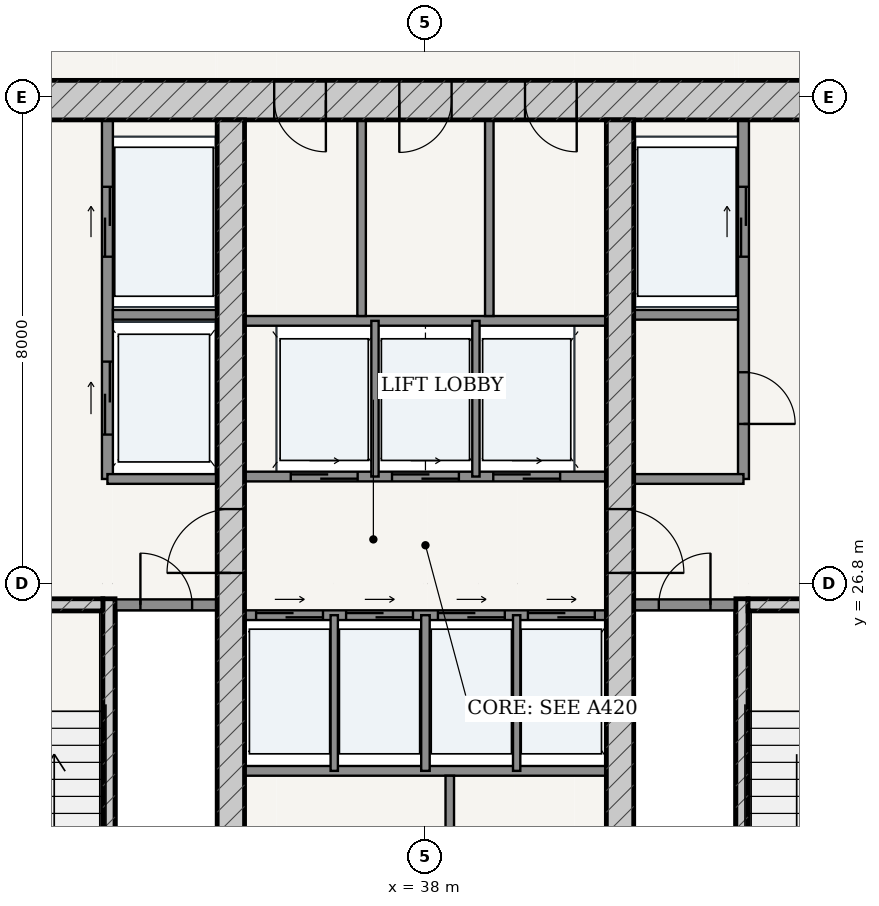
"""IFC4 building model, lengths in metres.
Left out: names, types, materials, properties, quantities, classifications, styles, units other than length and angle.
Written with IfcOpenShell. Run it as: python <this file> out.ifc"""

import sys

from ifc_helpers import new_model, si_unit, direction, frame, frame_2d, origin, place, context, subcontext, project, spatial, rectangle, extrude, source, transform, mapped, element, fill, save


model = new_model("IFC4")
c1 = context("Model", 3, precision=1e-05, world=origin(), true_north=direction((-0.2419218956, 0.970295726276)))
c2 = subcontext(c1, "Body", "Model", "MODEL_VIEW")
j1 = project(units=[si_unit("LENGTHUNIT", "METRE"), si_unit("PLANEANGLEUNIT", "RADIAN")], contexts=[c1])
p1 = place(None, origin())
s1 = spatial("IfcSite", under=j1, at=p1, CompositionType="ELEMENT")
p2 = place(p1, origin())
s2 = spatial("IfcBuilding", under=s1, at=p2, CompositionType="ELEMENT")
p3 = place(p2, frame((0.0, 0.0, 130.2)))
s3 = spatial("IfcBuildingStorey", under=s2, at=p3, CompositionType="ELEMENT", Elevation=130.2)
p4 = place(p3, frame((28.725, 34.75, 0.0), z_axis=(0.0, 0.0, 1.0), x_axis=(1.0, 0.0, 0.0)))
e1 = element("IfcWall", 1, at=p4, inside=s3, PredefinedType="SHEAR", context=c2, shape_type="SweptSolid", body=[
    extrude(rectangle(XDim=18.55, YDim=0.65, at=frame_2d((9.275, 0.0))), origin(), (0.0, 0.0, 1.0), 4.93),
])
p5 = place(p4, frame((6.788, 0.0, 0.0)))
e2 = element("IfcOpeningElement", 2, at=p5, cuts=e1, PredefinedType="OPENING", context=c2, shape_type="SweptSolid", body=[
    extrude(rectangle(XDim=0.85, YDim=2.1, at=frame_2d((0.425, 1.05))), frame((0.0, 0.335, 0.0), z_axis=(0.0, -1.0, 0.0), x_axis=(1.0, 0.0, 0.0)), (0.0, 0.0, 1.0), 0.67),
])
p6 = place(p4, frame((8.845, 0.0, 0.0)))
e3 = element("IfcOpeningElement", 3, at=p6, cuts=e1, PredefinedType="OPENING", context=c2, shape_type="SweptSolid", body=[
    extrude(rectangle(XDim=0.86, YDim=2.1, at=frame_2d((0.43, 1.05))), frame((0.0, 0.335, 0.0), z_axis=(0.0, -1.0, 0.0), x_axis=(1.0, 0.0, 0.0)), (0.0, 0.0, 1.0), 0.67),
])
p7 = place(p4, frame((10.913, 0.0, 0.0)))
e4 = element("IfcOpeningElement", 4, at=p7, cuts=e1, PredefinedType="OPENING", context=c2, shape_type="SweptSolid", body=[
    extrude(rectangle(XDim=0.85, YDim=2.1, at=frame_2d((0.425, 1.05))), frame((0.0, 0.335, 0.0), z_axis=(0.0, -1.0, 0.0), x_axis=(1.0, 0.0, 0.0)), (0.0, 0.0, 1.0), 0.67),
])
p8 = place(p3, frame((32.795, 19.175, 0.0), z_axis=(0.0, 0.0, 1.0), x_axis=(0.0, 1.0, 0.0)))
e5 = element("IfcWall", 5, at=p8, inside=s3, PredefinedType="SOLIDWALL", context=c2, shape_type="SweptSolid", body=[
    extrude(rectangle(XDim=7.375, YDim=0.2, at=frame_2d((3.688, 0.0))), origin(), (0.0, 0.0, 1.0), 4.93),
])
p9 = place(p3, frame((29.375, 26.45, 0.0), z_axis=(0.0, 0.0, 1.0), x_axis=(1.0, 0.0, 0.0)))
e6 = element("IfcWall", 6, at=p9, inside=s3, PredefinedType="SOLIDWALL", context=c2, shape_type="SweptSolid", body=[
    extrude(rectangle(XDim=3.32, YDim=0.2, at=frame_2d((1.66, 0.0))), origin(), (0.0, 0.0, 1.0), 4.93),
])
p10 = place(p9, frame((1.185, 0.0, 0.0)))
e7 = element("IfcOpeningElement", 7, at=p10, cuts=e6, PredefinedType="OPENING", context=c2, shape_type="SweptSolid", body=[
    extrude(rectangle(XDim=0.95, YDim=2.15, at=frame_2d((0.475, 1.075))), frame((0.0, 0.11, 0.0), z_axis=(0.0, -1.0, 0.0), x_axis=(1.0, 0.0, 0.0)), (0.0, 0.0, 1.0), 0.22),
])
p11 = place(p3, frame((43.205, 19.175, 0.0), z_axis=(0.0, 0.0, 1.0), x_axis=(0.0, 1.0, 0.0)))
e8 = element("IfcWall", 8, at=p11, inside=s3, PredefinedType="SOLIDWALL", context=c2, shape_type="SweptSolid", body=[
    extrude(rectangle(XDim=7.375, YDim=0.2, at=frame_2d((3.688, 0.0))), origin(), (0.0, 0.0, 1.0), 4.93),
])
p12 = place(p3, frame((43.305, 26.45, 0.0), z_axis=(0.0, 0.0, 1.0), x_axis=(1.0, 0.0, 0.0)))
e9 = element("IfcWall", 9, at=p12, inside=s3, PredefinedType="SOLIDWALL", context=c2, shape_type="SweptSolid", body=[
    extrude(rectangle(XDim=3.32, YDim=0.2, at=frame_2d((1.66, 0.0))), origin(), (0.0, 0.0, 1.0), 4.93),
])
p13 = place(p12, frame((1.185, 0.0, 0.0)))
e10 = element("IfcOpeningElement", 10, at=p13, cuts=e9, PredefinedType="OPENING", context=c2, shape_type="SweptSolid", body=[
    extrude(rectangle(XDim=0.95, YDim=2.15, at=frame_2d((0.475, 1.075))), frame((0.0, 0.11, 0.0), z_axis=(0.0, -1.0, 0.0), x_axis=(1.0, 0.0, 0.0)), (0.0, 0.0, 1.0), 0.22),
])
p14 = place(p3, frame((34.8, 19.175, 0.0), z_axis=(0.0, 0.0, 1.0), x_axis=(0.0, 1.0, 0.0)))
e11 = element("IfcWall", 11, at=p14, inside=s3, PredefinedType="SHEAR", context=c2, shape_type="SweptSolid", body=[
    extrude(rectangle(XDim=15.25, YDim=0.45, at=frame_2d((7.625, 0.0))), origin(), (0.0, 0.0, 1.0), 4.93),
])
p15 = place(p14, frame((7.8, 0.0, 0.0)))
e12 = element("IfcOpeningElement", 12, at=p15, cuts=e11, PredefinedType="OPENING", context=c2, shape_type="SweptSolid", body=[
    extrude(rectangle(XDim=1.05, YDim=2.15, at=frame_2d((0.525, 1.075))), frame((0.0, 0.235, 0.0), z_axis=(0.0, -1.0, 0.0), x_axis=(1.0, 0.0, 0.0)), (0.0, 0.0, 1.0), 0.47),
])
p16 = place(p3, frame((41.2, 19.175, 0.0), z_axis=(0.0, 0.0, 1.0), x_axis=(0.0, 1.0, 0.0)))
e13 = element("IfcWall", 13, at=p16, inside=s3, PredefinedType="SHEAR", context=c2, shape_type="SweptSolid", body=[
    extrude(rectangle(XDim=15.25, YDim=0.45, at=frame_2d((7.625, 0.0))), origin(), (0.0, 0.0, 1.0), 4.93),
])
p17 = place(p16, frame((7.8, 0.0, 0.0)))
e14 = element("IfcOpeningElement", 14, at=p17, cuts=e13, PredefinedType="OPENING", context=c2, shape_type="SweptSolid", body=[
    extrude(rectangle(XDim=1.05, YDim=2.15, at=frame_2d((0.525, 1.075))), frame((0.0, 0.235, 0.0), z_axis=(0.0, -1.0, 0.0), x_axis=(1.0, 0.0, 0.0)), (0.0, 0.0, 1.0), 0.47),
])
p18 = place(p3, frame((32.9, 26.45, 0.0), z_axis=(0.0, 0.0, 1.0), x_axis=(1.0, 0.0, 0.0)))
e15 = element("IfcWall", 15, at=p18, inside=s3, PredefinedType="PARTITIONING", context=c2, shape_type="SweptSolid", body=[
    extrude(rectangle(XDim=1.675, YDim=0.18, at=frame_2d((0.837, 0.0))), origin(), (0.0, 0.0, 1.0), 4.93),
])
p19 = place(p18, frame((0.413, 0.0, 0.0)))
e16 = element("IfcOpeningElement", 16, at=p19, cuts=e15, PredefinedType="OPENING", context=c2, shape_type="SweptSolid", body=[
    extrude(rectangle(XDim=0.85, YDim=2.1, at=frame_2d((0.425, 1.05))), frame((0.0, 0.1, 0.0), z_axis=(0.0, -1.0, 0.0), x_axis=(1.0, 0.0, 0.0)), (0.0, 0.0, 1.0), 0.2),
])
p20 = place(p3, frame((41.425, 26.45, 0.0), z_axis=(0.0, 0.0, 1.0), x_axis=(1.0, 0.0, 0.0)))
e17 = element("IfcWall", 17, at=p20, inside=s3, PredefinedType="PARTITIONING", context=c2, shape_type="SweptSolid", body=[
    extrude(rectangle(XDim=1.675, YDim=0.18, at=frame_2d((0.837, 0.0))), origin(), (0.0, 0.0, 1.0), 4.93),
])
p21 = place(p20, frame((0.413, 0.0, 0.0)))
e18 = element("IfcOpeningElement", 18, at=p21, cuts=e17, PredefinedType="OPENING", context=c2, shape_type="SweptSolid", body=[
    extrude(rectangle(XDim=0.85, YDim=2.1, at=frame_2d((0.425, 1.05))), frame((0.0, 0.1, 0.0), z_axis=(0.0, -1.0, 0.0), x_axis=(1.0, 0.0, 0.0)), (0.0, 0.0, 1.0), 0.2),
])
p22 = place(p3, frame((32.77, 28.52, 0.0), z_axis=(0.0, 0.0, 1.0), x_axis=(0.0, 1.0, 0.0)))
e19 = element("IfcWall", 19, at=p22, inside=s3, PredefinedType="PARTITIONING", context=c2, shape_type="SweptSolid", body=[
    extrude(rectangle(XDim=5.905, YDim=0.18, at=frame_2d((2.953, 0.0))), origin(), (0.0, 0.0, 1.0), 4.93),
])
p23 = place(p22, frame((3.655, 0.0, 0.0)))
e20 = element("IfcOpeningElement", 20, at=p23, cuts=e19, PredefinedType="OPENING", context=c2, shape_type="SweptSolid", body=[
    extrude(rectangle(XDim=1.15, YDim=2.2, at=frame_2d((0.575, 1.1))), frame((0.0, 0.1, 0.0), z_axis=(0.0, -1.0, 0.0), x_axis=(1.0, 0.0, 0.0)), (0.0, 0.0, 1.0), 0.2),
])
p24 = place(p22, frame((0.73, 0.0, 0.0)))
e21 = element("IfcOpeningElement", 21, at=p24, cuts=e19, PredefinedType="OPENING", context=c2, shape_type="SweptSolid", body=[
    extrude(rectangle(XDim=1.2, YDim=2.25, at=frame_2d((0.6, 1.125))), frame((0.0, 0.1, 0.0), z_axis=(0.0, -1.0, 0.0), x_axis=(1.0, 0.0, 0.0)), (0.0, 0.0, 1.0), 0.2),
])
p25 = place(p3, frame((32.86, 31.22, 0.0), z_axis=(0.0, 0.0, 1.0), x_axis=(1.0, 0.0, 0.0)))
e22 = element("IfcWall", 22, at=p25, inside=s3, PredefinedType="PARTITIONING", context=c2, shape_type="SweptSolid", body=[
    extrude(rectangle(XDim=1.715, YDim=0.16, at=frame_2d((0.857, 0.0))), origin(), (0.0, 0.0, 1.0), 4.93),
])
p26 = place(p3, frame((32.77, 28.52, 0.0), z_axis=(0.0, 0.0, 1.0), x_axis=(1.0, 0.0, 0.0)))
e23 = element("IfcWall", 23, at=p26, inside=s3, PredefinedType="PARTITIONING", context=c2, shape_type="SweptSolid", body=[
    extrude(rectangle(XDim=1.805, YDim=0.16, at=frame_2d((0.902, 0.0))), origin(), (0.0, 0.0, 1.0), 4.93),
])
p27 = place(p3, frame((43.23, 28.52, 0.0), z_axis=(0.0, 0.0, 1.0), x_axis=(0.0, 1.0, 0.0)))
e24 = element("IfcWall", 24, at=p27, inside=s3, PredefinedType="PARTITIONING", context=c2, shape_type="SweptSolid", body=[
    extrude(rectangle(XDim=5.905, YDim=0.18, at=frame_2d((2.953, 0.0))), origin(), (0.0, 0.0, 1.0), 4.93),
])
p28 = place(p27, frame((0.905, 0.0, 0.0)))
e25 = element("IfcOpeningElement", 25, at=p28, cuts=e24, PredefinedType="OPENING", context=c2, shape_type="SweptSolid", body=[
    extrude(rectangle(XDim=0.85, YDim=2.1, at=frame_2d((0.425, 1.05))), frame((0.0, 0.1, 0.0), z_axis=(0.0, -1.0, 0.0), x_axis=(1.0, 0.0, 0.0)), (0.0, 0.0, 1.0), 0.2),
])
p29 = place(p27, frame((3.655, 0.0, 0.0)))
e26 = element("IfcOpeningElement", 26, at=p29, cuts=e24, PredefinedType="OPENING", context=c2, shape_type="SweptSolid", body=[
    extrude(rectangle(XDim=1.15, YDim=2.2, at=frame_2d((0.575, 1.1))), frame((0.0, 0.1, 0.0), z_axis=(0.0, -1.0, 0.0), x_axis=(1.0, 0.0, 0.0)), (0.0, 0.0, 1.0), 0.2),
])
p30 = place(p3, frame((41.425, 31.22, 0.0), z_axis=(0.0, 0.0, 1.0), x_axis=(1.0, 0.0, 0.0)))
e27 = element("IfcWall", 27, at=p30, inside=s3, PredefinedType="PARTITIONING", context=c2, shape_type="SweptSolid", body=[
    extrude(rectangle(XDim=1.715, YDim=0.16, at=frame_2d((0.857, 0.0))), origin(), (0.0, 0.0, 1.0), 4.93),
])
p31 = place(p3, frame((41.425, 28.52, 0.0), z_axis=(0.0, 0.0, 1.0), x_axis=(1.0, 0.0, 0.0)))
e28 = element("IfcWall", 28, at=p31, inside=s3, PredefinedType="PARTITIONING", context=c2, shape_type="SweptSolid", body=[
    extrude(rectangle(XDim=1.805, YDim=0.16, at=frame_2d((0.902, 0.0))), origin(), (0.0, 0.0, 1.0), 4.93),
])
p32 = place(p3, frame((35.025, 28.56, 0.0), z_axis=(0.0, 0.0, 1.0), x_axis=(1.0, 0.0, 0.0)))
e29 = element("IfcWall", 29, at=p32, inside=s3, PredefinedType="PARTITIONING", context=c2, shape_type="SweptSolid", body=[
    extrude(rectangle(XDim=5.95, YDim=0.16, at=frame_2d((2.975, 0.0))), origin(), (0.0, 0.0, 1.0), 4.93),
])
p33 = place(p32, frame((0.76, 0.0, 0.0)))
e30 = element("IfcOpeningElement", 30, at=p33, cuts=e29, PredefinedType="OPENING", context=c2, shape_type="SweptSolid", body=[
    extrude(rectangle(XDim=1.1, YDim=2.2, at=frame_2d((0.55, 1.1))), frame((0.0, 0.09, 0.0), z_axis=(0.0, -1.0, 0.0), x_axis=(1.0, 0.0, 0.0)), (0.0, 0.0, 1.0), 0.18),
])
p34 = place(p32, frame((2.425, 0.0, 0.0)))
e31 = element("IfcOpeningElement", 31, at=p34, cuts=e29, PredefinedType="OPENING", context=c2, shape_type="SweptSolid", body=[
    extrude(rectangle(XDim=1.1, YDim=2.2, at=frame_2d((0.55, 1.1))), frame((0.0, 0.09, 0.0), z_axis=(0.0, -1.0, 0.0), x_axis=(1.0, 0.0, 0.0)), (0.0, 0.0, 1.0), 0.18),
])
p35 = place(p32, frame((4.09, 0.0, 0.0)))
e32 = element("IfcOpeningElement", 32, at=p35, cuts=e29, PredefinedType="OPENING", context=c2, shape_type="SweptSolid", body=[
    extrude(rectangle(XDim=1.1, YDim=2.2, at=frame_2d((0.55, 1.1))), frame((0.0, 0.09, 0.0), z_axis=(0.0, -1.0, 0.0), x_axis=(1.0, 0.0, 0.0)), (0.0, 0.0, 1.0), 0.18),
])
p36 = place(p3, frame((35.025, 31.12, 0.0), z_axis=(0.0, 0.0, 1.0), x_axis=(1.0, 0.0, 0.0)))
e33 = element("IfcWall", 33, at=p36, inside=s3, PredefinedType="PARTITIONING", context=c2, shape_type="SweptSolid", body=[
    extrude(rectangle(XDim=5.95, YDim=0.16, at=frame_2d((2.975, 0.0))), origin(), (0.0, 0.0, 1.0), 4.93),
])
for number, where, z_axis, x_axis in (
    (34, (37.17, 28.56, 0.0), (0.0, 0.0, 1.0), (0.0, 1.0, 0.0)),
    (35, (38.83, 28.56, 0.0), (0.0, 0.0, 1.0), (0.0, 1.0, 0.0)),
):
    element("IfcWall", number, at=place(p3, frame(where, z_axis=z_axis, x_axis=x_axis)), inside=s3, PredefinedType="PARTITIONING", context=c2, shape_type="SweptSolid", body=[
        extrude(rectangle(XDim=2.56, YDim=0.12, at=frame_2d((1.28, 0.0))), origin(), (0.0, 0.0, 1.0), 4.93),
    ])
for number, where, z_axis, x_axis in (
    (36, (36.95, 31.2, 0.0), (0.0, 0.0, 1.0), (0.0, 1.0, 0.0)),
    (37, (39.05, 31.2, 0.0), (0.0, 0.0, 1.0), (0.0, 1.0, 0.0)),
):
    element("IfcWall", number, at=place(p3, frame(where, z_axis=z_axis, x_axis=x_axis)), inside=s3, PredefinedType="PARTITIONING", context=c2, shape_type="SweptSolid", body=[
        extrude(rectangle(XDim=3.225, YDim=0.14, at=frame_2d((1.613, 0.0))), origin(), (0.0, 0.0, 1.0), 4.93),
    ])
p37 = place(p3, frame((35.025, 26.28, 0.0), z_axis=(0.0, 0.0, 1.0), x_axis=(1.0, 0.0, 0.0)))
e38 = element("IfcWall", 38, at=p37, inside=s3, PredefinedType="PARTITIONING", context=c2, shape_type="SweptSolid", body=[
    extrude(rectangle(XDim=5.95, YDim=0.16, at=frame_2d((2.975, 0.0))), origin(), (0.0, 0.0, 1.0), 4.93),
])
p38 = place(p37, frame((0.19, 0.0, 0.0)))
e39 = element("IfcOpeningElement", 39, at=p38, cuts=e38, PredefinedType="OPENING", context=c2, shape_type="SweptSolid", body=[
    extrude(rectangle(XDim=1.1, YDim=2.2, at=frame_2d((0.55, 1.1))), frame((0.0, 0.09, 0.0), z_axis=(0.0, -1.0, 0.0), x_axis=(1.0, 0.0, 0.0)), (0.0, 0.0, 1.0), 0.18),
])
p39 = place(p37, frame((1.67, 0.0, 0.0)))
e40 = element("IfcOpeningElement", 40, at=p39, cuts=e38, PredefinedType="OPENING", context=c2, shape_type="SweptSolid", body=[
    extrude(rectangle(XDim=1.1, YDim=2.2, at=frame_2d((0.55, 1.1))), frame((0.0, 0.09, 0.0), z_axis=(0.0, -1.0, 0.0), x_axis=(1.0, 0.0, 0.0)), (0.0, 0.0, 1.0), 0.18),
])
p40 = place(p37, frame((3.18, 0.0, 0.0)))
e41 = element("IfcOpeningElement", 41, at=p40, cuts=e38, PredefinedType="OPENING", context=c2, shape_type="SweptSolid", body=[
    extrude(rectangle(XDim=1.1, YDim=2.2, at=frame_2d((0.55, 1.1))), frame((0.0, 0.09, 0.0), z_axis=(0.0, -1.0, 0.0), x_axis=(1.0, 0.0, 0.0)), (0.0, 0.0, 1.0), 0.18),
])
p41 = place(p37, frame((4.66, 0.0, 0.0)))
e42 = element("IfcOpeningElement", 42, at=p41, cuts=e38, PredefinedType="OPENING", context=c2, shape_type="SweptSolid", body=[
    extrude(rectangle(XDim=1.1, YDim=2.2, at=frame_2d((0.55, 1.1))), frame((0.0, 0.09, 0.0), z_axis=(0.0, -1.0, 0.0), x_axis=(1.0, 0.0, 0.0)), (0.0, 0.0, 1.0), 0.18),
])
p42 = place(p3, frame((35.025, 23.72, 0.0), z_axis=(0.0, 0.0, 1.0), x_axis=(1.0, 0.0, 0.0)))
e43 = element("IfcWall", 43, at=p42, inside=s3, PredefinedType="PARTITIONING", context=c2, shape_type="SweptSolid", body=[
    extrude(rectangle(XDim=5.95, YDim=0.16, at=frame_2d((2.975, 0.0))), origin(), (0.0, 0.0, 1.0), 4.93),
])
p43 = place(p3, frame((36.5, 23.72, 0.0), z_axis=(0.0, 0.0, 1.0), x_axis=(0.0, 1.0, 0.0)))
e44 = element("IfcWall", 44, at=p43, inside=s3, PredefinedType="PARTITIONING", context=c2, shape_type="SweptSolid", body=[
    extrude(rectangle(XDim=2.56, YDim=0.12, at=frame_2d((1.28, 0.0))), origin(), (0.0, 0.0, 1.0), 4.93),
])
p44 = place(p3, frame((38.0, 23.72, 0.0), z_axis=(0.0, 0.0, 1.0), x_axis=(0.0, 1.0, 0.0)))
e45 = element("IfcWall", 45, at=p44, inside=s3, PredefinedType="PARTITIONING", context=c2, shape_type="SweptSolid", body=[
    extrude(rectangle(XDim=2.56, YDim=0.14, at=frame_2d((1.28, 0.0))), origin(), (0.0, 0.0, 1.0), 4.93),
])
p45 = place(p3, frame((39.5, 23.72, 0.0), z_axis=(0.0, 0.0, 1.0), x_axis=(0.0, 1.0, 0.0)))
e46 = element("IfcWall", 46, at=p45, inside=s3, PredefinedType="PARTITIONING", context=c2, shape_type="SweptSolid", body=[
    extrude(rectangle(XDim=2.56, YDim=0.12, at=frame_2d((1.28, 0.0))), origin(), (0.0, 0.0, 1.0), 4.93),
])
p46 = place(p3, frame((38.4, 19.175, 0.0), z_axis=(0.0, 0.0, 1.0), x_axis=(0.0, 1.0, 0.0)))
e47 = element("IfcWall", 47, at=p46, inside=s3, PredefinedType="PARTITIONING", context=c2, shape_type="SweptSolid", body=[
    extrude(rectangle(XDim=4.465, YDim=0.14, at=frame_2d((2.232, 0.0))), origin(), (0.0, 0.0, 1.0), 4.93),
])
m1 = source(origin(), c2, "Body", "SweptSolid", [
    extrude(rectangle(XDim=1.05, YDim=2.15, at=frame_2d((0.525, 1.075))), frame((0.0, 0.025, 0.0), z_axis=(0.0, -1.0, 0.0), x_axis=(1.0, 0.0, 0.0)), (0.0, 0.0, 1.0), 0.05),
])
p47 = place(p15, origin())
e48 = element("IfcDoor", 48, at=p47, inside=s3, OperationType="SINGLE_SWING_LEFT", PredefinedType="DOOR", context=c2, shape_type="MappedRepresentation", body=[
    mapped(m1, transform((0.0, 0.0, 0.0), scale=1.0)),
])
fill(e12, e48)
p48 = place(p17, frame((1.05, 0.0, 0.0), z_axis=(0.0, 0.0, 1.0), x_axis=(-1.0, 0.0, 0.0)))
e49 = element("IfcDoor", 49, at=p48, inside=s3, OperationType="SINGLE_SWING_RIGHT", PredefinedType="DOOR", context=c2, shape_type="MappedRepresentation", body=[
    mapped(m1, transform((0.0, 0.0, 0.0), scale=1.0)),
])
fill(e14, e49)
m2 = source(origin(), c2, "Body", "SweptSolid", [
    extrude(rectangle(XDim=0.85, YDim=2.1, at=frame_2d((0.425, 1.05))), frame((0.0, 0.025, 0.0), z_axis=(0.0, -1.0, 0.0), x_axis=(1.0, 0.0, 0.0)), (0.0, 0.0, 1.0), 0.05),
])
p49 = place(p19, origin())
e50 = element("IfcDoor", 50, at=p49, inside=s3, OperationType="SINGLE_SWING_LEFT", PredefinedType="DOOR", context=c2, shape_type="MappedRepresentation", body=[
    mapped(m2, transform((0.0, 0.0, 0.0), scale=1.0)),
])
fill(e16, e50)
p50 = place(p21, origin())
e51 = element("IfcDoor", 51, at=p50, inside=s3, OperationType="SINGLE_SWING_RIGHT", PredefinedType="DOOR", context=c2, shape_type="MappedRepresentation", body=[
    mapped(m2, transform((0.0, 0.0, 0.0), scale=1.0)),
])
fill(e18, e51)
p51 = place(p28, frame((0.85, 0.0, 0.0), z_axis=(0.0, 0.0, 1.0), x_axis=(-1.0, 0.0, 0.0)))
e52 = element("IfcDoor", 52, at=p51, inside=s3, OperationType="SINGLE_SWING_RIGHT", PredefinedType="DOOR", context=c2, shape_type="MappedRepresentation", body=[
    mapped(m2, transform((0.0, 0.0, 0.0), scale=1.0)),
])
fill(e25, e52)
p52 = place(p5, frame((0.85, 0.0, 0.0), z_axis=(0.0, 0.0, 1.0), x_axis=(-1.0, 0.0, 0.0)))
e53 = element("IfcDoor", 53, at=p52, inside=s3, OperationType="SINGLE_SWING_LEFT", PredefinedType="DOOR", context=c2, shape_type="MappedRepresentation", body=[
    mapped(m2, transform((0.0, 0.0, 0.0), scale=1.0)),
])
fill(e2, e53)
m3 = source(origin(), c2, "Body", "SweptSolid", [
    extrude(rectangle(XDim=0.86, YDim=2.1, at=frame_2d((0.43, 1.05))), frame((0.0, 0.025, 0.0), z_axis=(0.0, -1.0, 0.0), x_axis=(1.0, 0.0, 0.0)), (0.0, 0.0, 1.0), 0.05),
])
p53 = place(p6, frame((0.86, 0.0, 0.0), z_axis=(0.0, 0.0, 1.0), x_axis=(-1.0, 0.0, 0.0)))
e54 = element("IfcDoor", 54, at=p53, inside=s3, OperationType="SINGLE_SWING_RIGHT", PredefinedType="DOOR", context=c2, shape_type="MappedRepresentation", body=[
    mapped(m3, transform((0.0, 0.0, 0.0), scale=1.0)),
])
fill(e3, e54)
p54 = place(p7, frame((0.85, 0.0, 0.0), z_axis=(0.0, 0.0, 1.0), x_axis=(-1.0, 0.0, 0.0)))
e55 = element("IfcDoor", 55, at=p54, inside=s3, OperationType="SINGLE_SWING_LEFT", PredefinedType="DOOR", context=c2, shape_type="MappedRepresentation", body=[
    mapped(m2, transform((0.0, 0.0, 0.0), scale=1.0)),
])
fill(e4, e55)
m4 = source(origin(), c2, "Body", "SweptSolid", [
    extrude(rectangle(XDim=1.15, YDim=2.2, at=frame_2d((0.575, 1.1))), frame((0.0, 0.025, 0.0), z_axis=(0.0, -1.0, 0.0), x_axis=(1.0, 0.0, 0.0)), (0.0, 0.0, 1.0), 0.05),
])
p55 = place(p23, origin())
e56 = element("IfcDoor", 56, at=p55, inside=s3, OperationType="DOUBLE_DOOR_SLIDING", PredefinedType="DOOR", context=c2, shape_type="MappedRepresentation", body=[
    mapped(m4, transform((0.0, 0.0, 0.0), scale=1.0)),
])
fill(e20, e56)
p56 = place(p29, origin())
e57 = element("IfcDoor", 57, at=p56, inside=s3, OperationType="DOUBLE_DOOR_SLIDING", PredefinedType="DOOR", context=c2, shape_type="MappedRepresentation", body=[
    mapped(m4, transform((0.0, 0.0, 0.0), scale=1.0)),
])
fill(e26, e57)
m5 = source(origin(), c2, "Body", "SweptSolid", [
    extrude(rectangle(XDim=1.2, YDim=2.25, at=frame_2d((0.6, 1.125))), frame((0.0, 0.025, 0.0), z_axis=(0.0, -1.0, 0.0), x_axis=(1.0, 0.0, 0.0)), (0.0, 0.0, 1.0), 0.05),
])
p57 = place(p24, origin())
e58 = element("IfcDoor", 58, at=p57, inside=s3, OperationType="DOUBLE_DOOR_SLIDING", PredefinedType="DOOR", context=c2, shape_type="MappedRepresentation", body=[
    mapped(m5, transform((0.0, 0.0, 0.0), scale=1.0)),
])
fill(e21, e58)
m6 = source(origin(), c2, "Body", "SweptSolid", [
    extrude(rectangle(XDim=1.1, YDim=2.2, at=frame_2d((0.55, 1.1))), frame((0.0, 0.025, 0.0), z_axis=(0.0, -1.0, 0.0), x_axis=(1.0, 0.0, 0.0)), (0.0, 0.0, 1.0), 0.05),
])
p58 = place(p33, origin())
e59 = element("IfcDoor", 59, at=p58, inside=s3, OperationType="DOUBLE_DOOR_SLIDING", PredefinedType="DOOR", context=c2, shape_type="MappedRepresentation", body=[
    mapped(m6, transform((0.0, 0.0, 0.0), scale=1.0)),
])
fill(e30, e59)
p59 = place(p34, origin())
e60 = element("IfcDoor", 60, at=p59, inside=s3, OperationType="DOUBLE_DOOR_SLIDING", PredefinedType="DOOR", context=c2, shape_type="MappedRepresentation", body=[
    mapped(m6, transform((0.0, 0.0, 0.0), scale=1.0)),
])
fill(e31, e60)
p60 = place(p35, origin())
e61 = element("IfcDoor", 61, at=p60, inside=s3, OperationType="DOUBLE_DOOR_SLIDING", PredefinedType="DOOR", context=c2, shape_type="MappedRepresentation", body=[
    mapped(m6, transform((0.0, 0.0, 0.0), scale=1.0)),
])
fill(e32, e61)
p61 = place(p38, origin())
e62 = element("IfcDoor", 62, at=p61, inside=s3, OperationType="DOUBLE_DOOR_SLIDING", PredefinedType="DOOR", context=c2, shape_type="MappedRepresentation", body=[
    mapped(m6, transform((0.0, 0.0, 0.0), scale=1.0)),
])
fill(e39, e62)
p62 = place(p39, origin())
e63 = element("IfcDoor", 63, at=p62, inside=s3, OperationType="DOUBLE_DOOR_SLIDING", PredefinedType="DOOR", context=c2, shape_type="MappedRepresentation", body=[
    mapped(m6, transform((0.0, 0.0, 0.0), scale=1.0)),
])
fill(e40, e63)
p63 = place(p40, origin())
e64 = element("IfcDoor", 64, at=p63, inside=s3, OperationType="DOUBLE_DOOR_SLIDING", PredefinedType="DOOR", context=c2, shape_type="MappedRepresentation", body=[
    mapped(m6, transform((0.0, 0.0, 0.0), scale=1.0)),
])
fill(e41, e64)
p64 = place(p41, origin())
e65 = element("IfcDoor", 65, at=p64, inside=s3, OperationType="DOUBLE_DOOR_SLIDING", PredefinedType="DOOR", context=c2, shape_type="MappedRepresentation", body=[
    mapped(m6, transform((0.0, 0.0, 0.0), scale=1.0)),
])
fill(e42, e65)
save(model, sys.argv[1])
